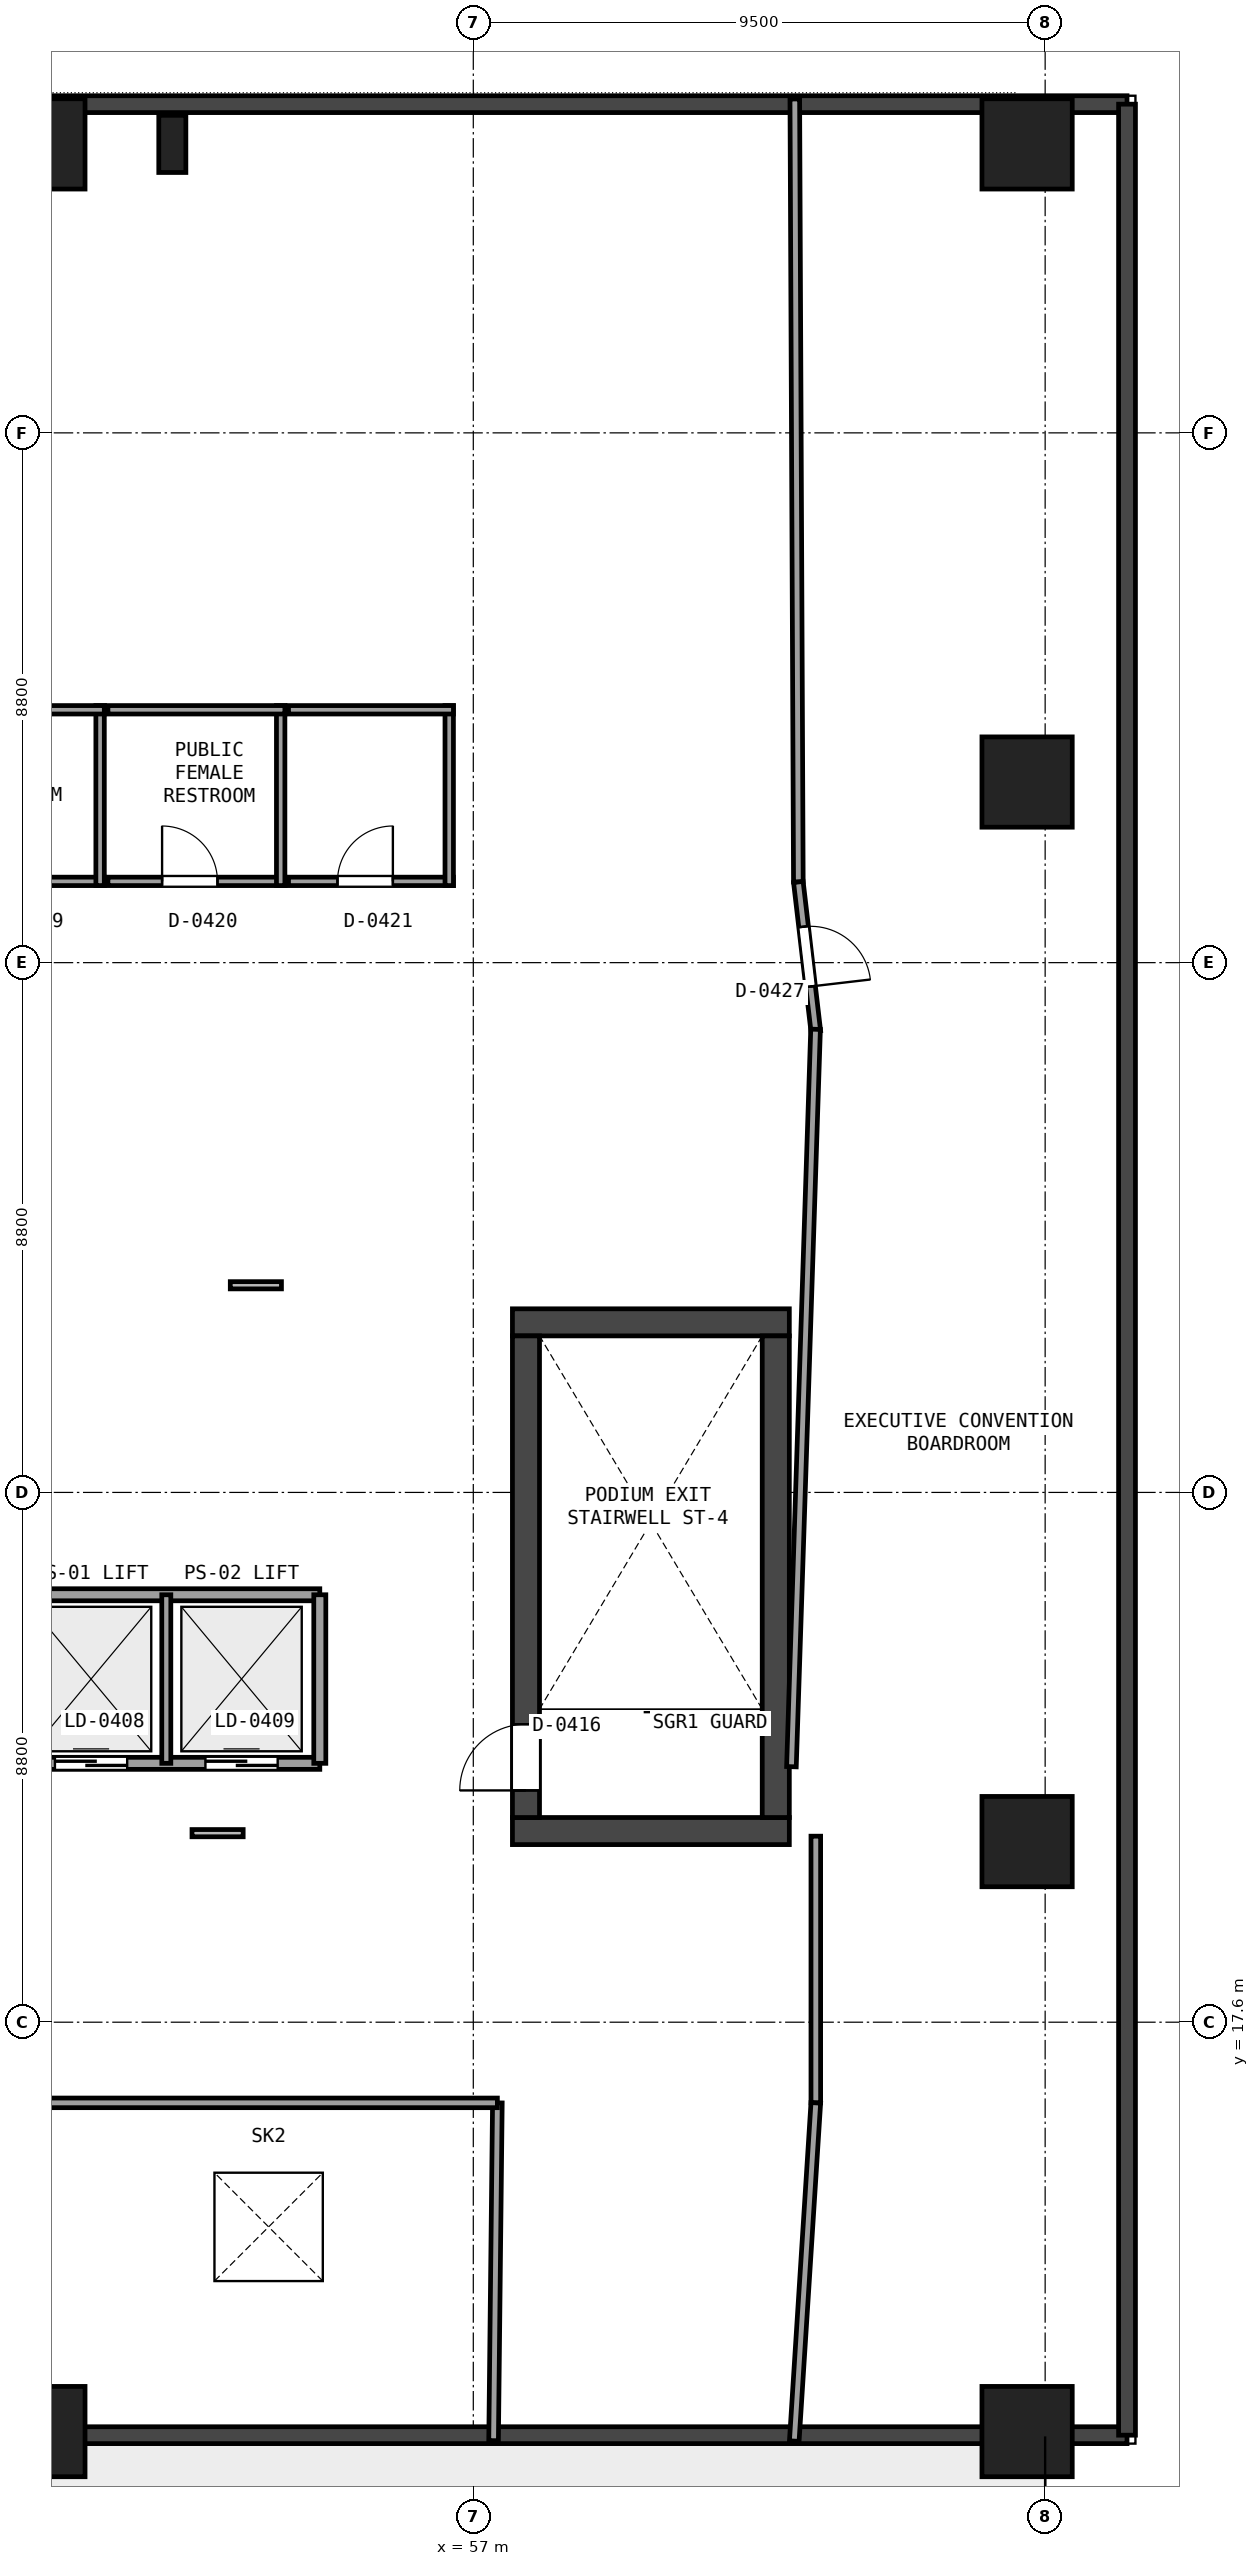
"""IFC4 building model, lengths in metres.
Left out: names, types, materials, properties, quantities, classifications, styles, units other than length and angle.
Written with IfcOpenShell. Run it as: python <this file> out.ifc"""

import sys

from ifc_helpers import new_model, si_unit, direction, frame, frame_2d, origin, origin_2d, place, context, subcontext, project, spatial, rectangle, extrude, element, fill, save


model = new_model("IFC4")
c1 = context("Model", 3, precision=1e-05, world=origin(), true_north=direction((0.0, 1.0)))
c2 = subcontext(c1, "Body", "Model", "MODEL_VIEW")
j1 = project(units=[si_unit("LENGTHUNIT", "METRE"), si_unit("PLANEANGLEUNIT", "RADIAN")], contexts=[c1])
p1 = place(None, origin())
s1 = spatial("IfcSite", under=j1, at=p1, CompositionType="ELEMENT")
p2 = place(p1, origin())
s2 = spatial("IfcBuilding", under=s1, at=p2, CompositionType="ELEMENT")
p3 = place(p2, frame((0.0, 0.0, 21.6)))
s3 = spatial("IfcBuildingStorey", under=s2, at=p3, CompositionType="ELEMENT", Elevation=21.6)
for number, where, z_axis, x_axis in (
    (1, (57.65, 20.775, 0.0), (0.0, 0.0, 1.0), (1.0, 0.0, 0.0)),
    (2, (57.65, 29.225, 0.0), (0.0, 0.0, 1.0), (1.0, 0.0, 0.0)),
):
    element("IfcWall", number, at=place(p3, frame(where, z_axis=z_axis, x_axis=x_axis)), inside=s3, PredefinedType="SHEAR", context=c2, shape_type="SweptSolid", body=[
        extrude(rectangle(XDim=4.6, YDim=0.45, at=frame_2d((2.3, 0.0))), origin(), (0.0, 0.0, 1.0), 4.98),
    ])
p4 = place(p3, frame((57.875, 21.0, 0.0), z_axis=(0.0, 0.0, 1.0), x_axis=(0.0, 1.0, 0.0)))
e3 = element("IfcWall", 3, at=p4, inside=s3, PredefinedType="SHEAR", context=c2, shape_type="SweptSolid", body=[
    extrude(rectangle(XDim=8.0, YDim=0.45, at=frame_2d((4.0, 0.0))), origin(), (0.0, 0.0, 1.0), 4.98),
])
p5 = place(p4, frame((0.45, 0.0, 0.0)))
e4 = element("IfcOpeningElement", 4, at=p5, cuts=e3, PredefinedType="OPENING", context=c2, shape_type="SweptSolid", body=[
    extrude(rectangle(XDim=1.1, YDim=2.15, at=frame_2d((0.55, 1.075))), frame((0.0, 0.235, 0.0), z_axis=(0.0, -1.0, 0.0), x_axis=(1.0, 0.0, 0.0)), (0.0, 0.0, 1.0), 0.47),
])
p6 = place(p3, frame((62.025, 21.0, 0.0), z_axis=(0.0, 0.0, 1.0), x_axis=(0.0, 1.0, 0.0)))
e5 = element("IfcWall", 5, at=p6, inside=s3, PredefinedType="SHEAR", context=c2, shape_type="SweptSolid", body=[
    extrude(rectangle(XDim=8.0, YDim=0.45, at=frame_2d((4.0, 0.0))), origin(), (0.0, 0.0, 1.0), 4.98),
])
for number, where, z_axis, x_axis in (
    (6, (49.8, 10.8, 0.0), (0.0, 0.0, 1.0), (1.0, 0.0, 0.0)),
    (7, (66.2, 10.8, 0.0), (0.0, 0.0, 1.0), (1.0, 0.0, 0.0)),
    (8, (66.2, 20.6, 0.0), (0.0, 0.0, 1.0), (1.0, 0.0, 0.0)),
    (9, (66.2, 38.2, 0.0), (0.0, 0.0, 1.0), (1.0, 0.0, 0.0)),
    (10, (66.2, 48.8, 0.0), (0.0, 0.0, 1.0), (1.0, 0.0, 0.0)),
    (11, (49.8, 48.8, 0.0), (0.0, 0.0, 1.0), (1.0, 0.0, 0.0)),
):
    element("IfcColumn", number, at=place(p3, frame(where, z_axis=z_axis, x_axis=x_axis)), inside=s3, PredefinedType="COLUMN", context=c2, shape_type="SweptSolid", body=[
        extrude(rectangle(XDim=1.5, YDim=1.5, at=origin_2d()), origin(), (0.0, 0.0, 1.0), 4.98),
    ])
p7 = place(p3, frame((52.0, 48.8, 0.0), z_axis=(0.0, 0.0, 1.0), x_axis=(1.0, 0.0, 0.0)))
e12 = element("IfcColumn", 12, at=p7, inside=s3, PredefinedType="PILASTER", context=c2, shape_type="SweptSolid", body=[
    extrude(rectangle(XDim=0.45, YDim=0.95, at=origin_2d()), origin(), (0.0, 0.0, 1.0), 4.98),
])
p8 = place(p3, frame((67.86, 10.74, 0.0), z_axis=(0.0, 0.0, 1.0), x_axis=(-1.0, 0.0, 0.0)))
e13 = element("IfcWall", 13, at=p8, inside=s3, PredefinedType="SOLIDWALL", context=c2, shape_type="SweptSolid", body=[
    extrude(rectangle(XDim=61.32, YDim=0.28, at=frame_2d((30.66, 0.0))), origin(), (0.0, 0.0, 1.0), 3.847),
])
p9 = place(p8, frame((32.26, 0.0, 0.0)))
e14 = element("IfcOpeningElement", 14, at=p9, cuts=e13, PredefinedType="OPENING", context=c2, shape_type="SweptSolid", body=[
    extrude(rectangle(XDim=1.2, YDim=2.2, at=frame_2d((0.6, 1.1))), frame((0.0, 0.15, 0.0), z_axis=(0.0, -1.0, 0.0), x_axis=(1.0, 0.0, 0.0)), (0.0, 0.0, 1.0), 0.3),
])
p10 = place(p3, frame((6.54, 49.46, 0.0), z_axis=(0.0, 0.0, 1.0), x_axis=(1.0, 0.0, 0.0)))
e15 = element("IfcWall", 15, at=p10, inside=s3, PredefinedType="SOLIDWALL", context=c2, shape_type="SweptSolid", body=[
    extrude(rectangle(XDim=61.32, YDim=0.28, at=frame_2d((30.66, 0.0))), origin(), (0.0, 0.0, 1.0), 4.98),
])
p11 = place(p3, frame((67.86, 49.46, 0.0), z_axis=(0.0, 0.0, 1.0), x_axis=(0.0, -1.0, 0.0)))
e16 = element("IfcWall", 16, at=p11, inside=s3, PredefinedType="SOLIDWALL", context=c2, shape_type="SweptSolid", body=[
    extrude(rectangle(XDim=38.72, YDim=0.28, at=frame_2d((19.36, 0.0))), origin(), (0.0, 0.0, 1.0), 4.98),
])
p12 = place(p3, frame((49.35, 24.7, 0.0), z_axis=(0.0, 0.0, 1.0), x_axis=(1.0, 0.0, 0.0)))
e17 = element("IfcWall", 17, at=p12, inside=s3, PredefinedType="SOLIDWALL", context=c2, shape_type="SweptSolid", body=[
    extrude(rectangle(XDim=5.1, YDim=0.2, at=frame_2d((2.55, 0.0))), origin(), (0.0, 0.0, 1.0), 4.98),
])
p13 = place(p3, frame((49.35, 21.9, 0.0), z_axis=(0.0, 0.0, 1.0), x_axis=(1.0, 0.0, 0.0)))
e18 = element("IfcWall", 18, at=p13, inside=s3, PredefinedType="SOLIDWALL", context=c2, shape_type="SweptSolid", body=[
    extrude(rectangle(XDim=5.1, YDim=0.2, at=frame_2d((2.55, 0.0))), origin(), (0.0, 0.0, 1.0), 3.847),
])
p14 = place(p13, frame((0.7, 0.0, 0.0)))
e19 = element("IfcOpeningElement", 19, at=p14, cuts=e18, PredefinedType="OPENING", context=c2, shape_type="SweptSolid", body=[
    extrude(rectangle(XDim=1.2, YDim=2.15, at=frame_2d((0.6, 1.075))), frame((0.0, 0.11, 0.0), z_axis=(0.0, -1.0, 0.0), x_axis=(1.0, 0.0, 0.0)), (0.0, 0.0, 1.0), 0.22),
])
p15 = place(p13, frame((3.2, 0.0, 0.0)))
e20 = element("IfcOpeningElement", 20, at=p15, cuts=e18, PredefinedType="OPENING", context=c2, shape_type="SweptSolid", body=[
    extrude(rectangle(XDim=1.2, YDim=2.15, at=frame_2d((0.6, 1.075))), frame((0.0, 0.11, 0.0), z_axis=(0.0, -1.0, 0.0), x_axis=(1.0, 0.0, 0.0)), (0.0, 0.0, 1.0), 0.22),
])
p16 = place(p3, frame((54.45, 21.9, 0.0), z_axis=(0.0, 0.0, 1.0), x_axis=(0.0, 1.0, 0.0)))
e21 = element("IfcWall", 21, at=p16, inside=s3, PredefinedType="SOLIDWALL", context=c2, shape_type="SweptSolid", body=[
    extrude(rectangle(XDim=2.8, YDim=0.2, at=frame_2d((1.4, 0.0))), origin(), (0.0, 0.0, 1.0), 4.98),
])
p17 = place(p3, frame((51.9, 21.9, 0.0), z_axis=(0.0, 0.0, 1.0), x_axis=(0.0, 1.0, 0.0)))
e22 = element("IfcWall", 22, at=p17, inside=s3, PredefinedType="PARTITIONING", context=c2, shape_type="SweptSolid", body=[
    extrude(rectangle(XDim=2.8, YDim=0.15, at=frame_2d((1.4, 0.0))), origin(), (0.0, 0.0, 1.0), 4.98),
])
p18 = place(p3, frame((47.93, 36.55, 0.0), z_axis=(0.0, 0.0, 1.0), x_axis=(1.0, 0.0, 0.0)))
e23 = element("IfcWall", 23, at=p18, inside=s3, PredefinedType="PARTITIONING", context=c2, shape_type="SweptSolid", body=[
    extrude(rectangle(XDim=2.94, YDim=0.14, at=frame_2d((1.47, 0.0))), origin(), (0.0, 0.0, 1.0), 3.847),
])
p19 = place(p18, frame((1.01, 0.0, 0.0)))
e24 = element("IfcOpeningElement", 24, at=p19, cuts=e23, PredefinedType="OPENING", context=c2, shape_type="SweptSolid", body=[
    extrude(rectangle(XDim=0.92, YDim=2.1, at=frame_2d((0.46, 1.05))), frame((0.0, 0.08, 0.0), z_axis=(0.0, -1.0, 0.0), x_axis=(1.0, 0.0, 0.0)), (0.0, 0.0, 1.0), 0.16),
])
p20 = place(p3, frame((50.8, 36.48, 0.0), z_axis=(0.0, 0.0, 1.0), x_axis=(0.0, 1.0, 0.0)))
e25 = element("IfcWall", 25, at=p20, inside=s3, PredefinedType="PARTITIONING", context=c2, shape_type="SweptSolid", body=[
    extrude(rectangle(XDim=2.99, YDim=0.14, at=frame_2d((1.495, 0.0))), origin(), (0.0, 0.0, 1.0), 4.609),
])
p21 = place(p3, frame((50.87, 39.4, 0.0), z_axis=(0.0, 0.0, 1.0), x_axis=(-1.0, 0.0, 0.0)))
e26 = element("IfcWall", 26, at=p21, inside=s3, PredefinedType="PARTITIONING", context=c2, shape_type="SweptSolid", body=[
    extrude(rectangle(XDim=2.94, YDim=0.14, at=frame_2d((1.47, 0.0))), origin(), (0.0, 0.0, 1.0), 3.847),
])
p22 = place(p3, frame((50.93, 36.55, 0.0), z_axis=(0.0, 0.0, 1.0), x_axis=(1.0, 0.0, 0.0)))
e27 = element("IfcWall", 27, at=p22, inside=s3, PredefinedType="PARTITIONING", context=c2, shape_type="SweptSolid", body=[
    extrude(rectangle(XDim=2.94, YDim=0.14, at=frame_2d((1.47, 0.0))), origin(), (0.0, 0.0, 1.0), 4.98),
])
p23 = place(p22, frame((0.9, 0.0, 0.0)))
e28 = element("IfcOpeningElement", 28, at=p23, cuts=e27, PredefinedType="OPENING", context=c2, shape_type="SweptSolid", body=[
    extrude(rectangle(XDim=0.92, YDim=2.1, at=frame_2d((0.46, 1.05))), frame((0.0, 0.08, 0.0), z_axis=(0.0, -1.0, 0.0), x_axis=(1.0, 0.0, 0.0)), (0.0, 0.0, 1.0), 0.16),
])
p24 = place(p3, frame((53.8, 36.48, 0.0), z_axis=(0.0, 0.0, 1.0), x_axis=(0.0, 1.0, 0.0)))
e29 = element("IfcWall", 29, at=p24, inside=s3, PredefinedType="PARTITIONING", context=c2, shape_type="SweptSolid", body=[
    extrude(rectangle(XDim=2.99, YDim=0.14, at=frame_2d((1.495, 0.0))), origin(), (0.0, 0.0, 1.0), 4.609),
])
p25 = place(p3, frame((53.87, 39.4, 0.0), z_axis=(0.0, 0.0, 1.0), x_axis=(-1.0, 0.0, 0.0)))
e30 = element("IfcWall", 30, at=p25, inside=s3, PredefinedType="PARTITIONING", context=c2, shape_type="SweptSolid", body=[
    extrude(rectangle(XDim=2.94, YDim=0.14, at=frame_2d((1.47, 0.0))), origin(), (0.0, 0.0, 1.0), 4.609),
])
p26 = place(p3, frame((53.93, 36.55, 0.0), z_axis=(0.0, 0.0, 1.0), x_axis=(1.0, 0.0, 0.0)))
e31 = element("IfcWall", 31, at=p26, inside=s3, PredefinedType="PARTITIONING", context=c2, shape_type="SweptSolid", body=[
    extrude(rectangle(XDim=2.74, YDim=0.14, at=frame_2d((1.37, 0.0))), origin(), (0.0, 0.0, 1.0), 4.98),
])
p27 = place(p26, frame((0.814, 0.0, 0.0)))
e32 = element("IfcOpeningElement", 32, at=p27, cuts=e31, PredefinedType="OPENING", context=c2, shape_type="SweptSolid", body=[
    extrude(rectangle(XDim=0.92, YDim=2.1, at=frame_2d((0.46, 1.05))), frame((0.0, 0.08, 0.0), z_axis=(0.0, -1.0, 0.0), x_axis=(1.0, 0.0, 0.0)), (0.0, 0.0, 1.0), 0.16),
])
p28 = place(p3, frame((56.6, 36.48, 0.0), z_axis=(0.0, 0.0, 1.0), x_axis=(0.0, 1.0, 0.0)))
e33 = element("IfcWall", 33, at=p28, inside=s3, PredefinedType="PARTITIONING", context=c2, shape_type="SweptSolid", body=[
    extrude(rectangle(XDim=2.99, YDim=0.14, at=frame_2d((1.495, 0.0))), origin(), (0.0, 0.0, 1.0), 4.609),
])
p29 = place(p3, frame((56.67, 39.4, 0.0), z_axis=(0.0, 0.0, 1.0), x_axis=(-1.0, 0.0, 0.0)))
e34 = element("IfcWall", 34, at=p29, inside=s3, PredefinedType="PARTITIONING", context=c2, shape_type="SweptSolid", body=[
    extrude(rectangle(XDim=2.74, YDim=0.14, at=frame_2d((1.37, 0.0))), origin(), (0.0, 0.0, 1.0), 4.609),
])
p30 = place(p3, frame((57.337, 10.649, 0.0), z_axis=(0.0, 0.0, 1.0), x_axis=(0.011224981311, 0.999936997913, 0.0)))
e35 = element("IfcWall", 35, at=p30, inside=s3, PredefinedType="PARTITIONING", context=c2, shape_type="SweptSolid", body=[
    extrude(rectangle(XDim=5.611, YDim=0.16, at=frame_2d((2.806, 0.0))), origin(), (0.0, 0.0, 1.0), 4.121),
])
p31 = place(p3, frame((57.4, 16.26, 0.0), z_axis=(0.0, 0.0, 1.0), x_axis=(-0.99999999956, 2.9665668e-05, 0.0)))
e36 = element("IfcWall", 36, at=p31, inside=s3, PredefinedType="PARTITIONING", context=c2, shape_type="SweptSolid", body=[
    extrude(rectangle(XDim=32.919, YDim=0.16, at=frame_2d((16.459, 0.0))), origin(), (0.0, 0.0, 1.0), 3.847),
])
p32 = place(p31, frame((15.96, 0.0, 0.0)))
e37 = element("IfcOpeningElement", 37, at=p32, cuts=e36, PredefinedType="OPENING", context=c2, shape_type="SweptSolid", body=[
    extrude(rectangle(XDim=1.0, YDim=2.15, at=frame_2d((0.5, 1.075))), frame((0.0, 0.09, 0.0), z_axis=(0.0, -1.0, 0.0), x_axis=(1.0, 0.0, 0.0)), (0.0, 0.0, 1.0), 0.18),
])
p33 = place(p3, frame((62.341, 49.546, 0.0), z_axis=(0.0, 0.0, 1.0), x_axis=(0.004523906252, -0.999989767084, 0.0)))
e38 = element("IfcWall", 38, at=p33, inside=s3, PredefinedType="PARTITIONING", context=c2, shape_type="SweptSolid", body=[
    extrude(rectangle(XDim=13.006, YDim=0.16, at=frame_2d((6.503, 0.0))), origin(), (0.0, 0.0, 1.0), 3.847),
])
p34 = place(p3, frame((62.4, 36.54, 0.0), z_axis=(0.0, 0.0, 1.0), x_axis=(0.116160443909, -0.993230462315, 0.0)))
e39 = element("IfcWall", 39, at=p34, inside=s3, PredefinedType="PARTITIONING", context=c2, shape_type="SweptSolid", body=[
    extrude(rectangle(XDim=2.497, YDim=0.16, at=frame_2d((1.249, 0.0))), origin(), (0.0, 0.0, 1.0), 4.609),
])
p35 = place(p34, frame((0.748, 0.0, 0.0)))
e40 = element("IfcOpeningElement", 40, at=p35, cuts=e39, PredefinedType="OPENING", context=c2, shape_type="SweptSolid", body=[
    extrude(rectangle(XDim=1.0, YDim=2.15, at=frame_2d((0.5, 1.075))), frame((0.0, 0.09, 0.0), z_axis=(0.0, -1.0, 0.0), x_axis=(1.0, 0.0, 0.0)), (0.0, 0.0, 1.0), 0.18),
])
p36 = place(p3, frame((62.686, 34.093, 0.0), z_axis=(0.0, 0.0, 1.0), x_axis=(-0.032729804283, -0.999464236435, 0.0)))
e41 = element("IfcWall", 41, at=p36, inside=s3, PredefinedType="PARTITIONING", context=c2, shape_type="SweptSolid", body=[
    extrude(rectangle(XDim=12.256, YDim=0.16, at=frame_2d((6.128, 0.0))), origin(), (0.0, 0.0, 1.0), 3.847),
])
p37 = place(p3, frame((62.69, 20.69, 0.0), z_axis=(0.0, 0.0, 1.0), x_axis=(0.0, -1.0, 0.0)))
e42 = element("IfcWall", 42, at=p37, inside=s3, PredefinedType="PARTITIONING", context=c2, shape_type="SweptSolid", body=[
    extrude(rectangle(XDim=4.43, YDim=0.16, at=frame_2d((2.215, 0.0))), origin(), (0.0, 0.0, 1.0), 3.847),
])
p38 = place(p3, frame((62.69, 16.26, 0.0), z_axis=(0.0, 0.0, 1.0), x_axis=(-0.063579763171, -0.997976760108, 0.0)))
e43 = element("IfcWall", 43, at=p38, inside=s3, PredefinedType="PARTITIONING", context=c2, shape_type="SweptSolid", body=[
    extrude(rectangle(XDim=5.629, YDim=0.16, at=frame_2d((2.815, 0.0))), origin(), (0.0, 0.0, 1.0), 4.121),
])
p39 = place(p3, frame((0.0, 0.0, -0.42)))
p40 = place(p39, frame((53.6, 14.2, 0.0)))
p41 = place(p40, frame((0.0, 0.0, 0.37)))
e44 = element("IfcWindow", 44, at=p41, inside=s3, PartitioningType="SINGLE_PANEL", PredefinedType="SKYLIGHT", context=c2, shape_type="SweptSolid", body=[
    extrude(rectangle(XDim=1.8, YDim=1.8, at=origin_2d()), origin(), (0.0, 0.0, 1.0), 0.05),
])
p42 = place(p5, origin())
e45 = element("IfcDoor", 45, at=p42, inside=s3, OperationType="SINGLE_SWING_LEFT", PredefinedType="DOOR", context=c2, shape_type="SweptSolid", body=[
    extrude(rectangle(XDim=1.1, YDim=2.15, at=frame_2d((0.55, 1.075))), frame((0.0, 0.025, 0.0), z_axis=(0.0, -1.0, 0.0), x_axis=(1.0, 0.0, 0.0)), (0.0, 0.0, 1.0), 0.05),
])
fill(e4, e45)
p43 = place(p14, origin())
e46 = element("IfcDoor", 46, at=p43, inside=s3, OperationType="SLIDING_TO_LEFT", PredefinedType="DOOR", context=c2, shape_type="SweptSolid", body=[
    extrude(rectangle(XDim=1.2, YDim=2.15, at=frame_2d((0.6, 1.075))), frame((0.0, 0.025, 0.0), z_axis=(0.0, -1.0, 0.0), x_axis=(1.0, 0.0, 0.0)), (0.0, 0.0, 1.0), 0.05),
])
fill(e19, e46)
p44 = place(p15, origin())
e47 = element("IfcDoor", 47, at=p44, inside=s3, OperationType="SLIDING_TO_LEFT", PredefinedType="DOOR", context=c2, shape_type="SweptSolid", body=[
    extrude(rectangle(XDim=1.2, YDim=2.15, at=frame_2d((0.6, 1.075))), frame((0.0, 0.025, 0.0), z_axis=(0.0, -1.0, 0.0), x_axis=(1.0, 0.0, 0.0)), (0.0, 0.0, 1.0), 0.05),
])
fill(e20, e47)
p45 = place(p23, origin())
e48 = element("IfcDoor", 48, at=p45, inside=s3, OperationType="SINGLE_SWING_LEFT", PredefinedType="DOOR", context=c2, shape_type="SweptSolid", body=[
    extrude(rectangle(XDim=0.92, YDim=2.1, at=frame_2d((0.46, 1.05))), frame((0.0, 0.025, 0.0), z_axis=(0.0, -1.0, 0.0), x_axis=(1.0, 0.0, 0.0)), (0.0, 0.0, 1.0), 0.05),
])
fill(e28, e48)
p46 = place(p27, origin())
e49 = element("IfcDoor", 49, at=p46, inside=s3, OperationType="SINGLE_SWING_RIGHT", PredefinedType="DOOR", context=c2, shape_type="SweptSolid", body=[
    extrude(rectangle(XDim=0.92, YDim=2.1, at=frame_2d((0.46, 1.05))), frame((0.0, 0.025, 0.0), z_axis=(0.0, -1.0, 0.0), x_axis=(1.0, 0.0, 0.0)), (0.0, 0.0, 1.0), 0.05),
])
fill(e32, e49)
p47 = place(p35, origin())
e50 = element("IfcDoor", 50, at=p47, inside=s3, OperationType="SINGLE_SWING_RIGHT", PredefinedType="DOOR", context=c2, shape_type="SweptSolid", body=[
    extrude(rectangle(XDim=1.0, YDim=2.15, at=frame_2d((0.5, 1.075))), frame((0.0, 0.025, 0.0), z_axis=(0.0, -1.0, 0.0), x_axis=(1.0, 0.0, 0.0)), (0.0, 0.0, 1.0), 0.05),
])
fill(e40, e50)
save(model, sys.argv[1])
